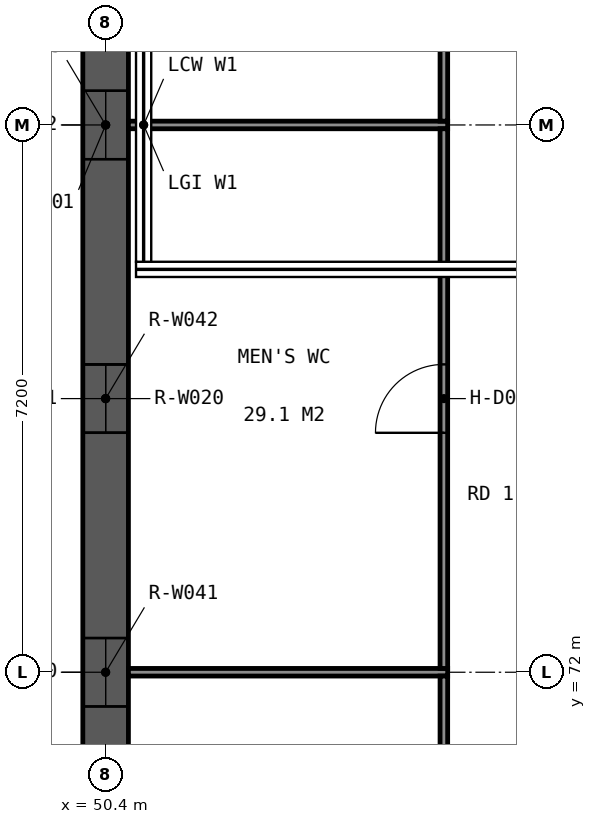
"""IFC4 building model, lengths in metres.
Left out: names, types, materials, properties, quantities, classifications, styles, units other than length and angle.
Written with IfcOpenShell. Run it as: python <this file> out.ifc"""

import sys

from ifc_helpers import new_model, si_unit, direction, frame, frame_2d, origin, place, context, subcontext, project, spatial, polyline, rectangle, outline, extrude, element, fill, save


model = new_model("IFC4")
c1 = context("Model", 3, precision=1e-05, world=origin(), true_north=direction((0.0, 1.0)))
c2 = subcontext(c1, "Body", "Model", "MODEL_VIEW")
j1 = project(units=[si_unit("LENGTHUNIT", "METRE"), si_unit("PLANEANGLEUNIT", "RADIAN")], contexts=[c1])
p1 = place(None, origin())
s1 = spatial("IfcSite", under=j1, at=p1, CompositionType="ELEMENT")
p2 = place(p1, origin())
s2 = spatial("IfcBuilding", under=s1, at=p2, CompositionType="ELEMENT")
p3 = place(p2, frame((0.0, 0.0, 9.6)))
s3 = spatial("IfcBuildingStorey", under=s2, at=p3, CompositionType="ELEMENT", Elevation=9.6)
p4 = place(p3, frame((50.4, 52.2, 0.0), z_axis=(0.0, 0.0, 1.0), x_axis=(0.0, 1.0, 0.0)))
e1 = element("IfcWall", 1, at=p4, inside=s3, PredefinedType="SOLIDWALL", context=c2, shape_type="SweptSolid", body=[
    extrude(outline(polyline([(0.0, 0.0), (54.0, 0.0), (54.0, 6.409), (53.7, 6.509), (53.4, 6.609), (53.1, 6.709), (52.8, 6.809), (52.5, 6.909), (52.2, 7.009), (51.9, 7.109), (51.6, 7.209), (51.3, 7.309), (51.0, 7.409), (50.764, 7.488), (50.762, 7.489), (50.7, 7.509), (50.4, 7.609), (50.1, 7.709), (49.8, 7.809), (49.5, 7.909), (49.2, 8.009), (48.9, 8.109), (48.6, 8.209), (48.3, 8.309), (48.0, 8.409), (47.7, 8.509), (47.4, 8.609), (47.1, 8.709), (46.8, 8.809), (46.5, 8.909), (46.2, 9.009), (46.027, 9.067), (46.025, 9.068), (45.964, 9.088), (45.962, 9.3), (45.9, 9.32), (45.6, 9.42), (45.3, 9.52), (45.0, 9.62), (44.7, 9.72), (44.4, 9.82), (44.1, 9.92), (43.8, 10.02), (43.5, 10.12), (43.2, 10.22), (42.9, 10.32), (42.6, 10.42), (42.3, 10.52), (42.0, 10.62), (41.7, 10.72), (41.4, 10.82), (41.227, 10.878), (41.225, 10.878), (41.1, 10.92), (40.8, 11.02), (40.5, 11.12), (40.2, 11.22), (39.9, 11.32), (39.6, 11.42), (39.3, 11.52), (39.0, 11.62), (38.7, 11.72), (38.4, 11.82), (38.1, 11.92), (37.8, 12.02), (37.5, 12.12), (37.2, 12.22), (36.9, 12.32), (36.6, 12.42), (36.49, 12.457), (36.488, 12.458), (36.427, 12.478), (36.425, 12.689), (36.3, 12.731), (36.0, 12.831), (35.7, 12.931), (35.4, 13.031), (35.1, 13.131), (34.8, 13.231), (34.5, 13.331), (34.2, 13.431), (33.9, 13.531), (33.6, 13.631), (33.3, 13.731), (33.0, 13.831), (32.7, 13.931), (32.4, 14.031), (32.1, 14.131), (31.8, 14.231), (31.69, 14.268), (31.688, 14.268), (31.5, 14.331), (31.2, 14.431), (30.9, 14.531), (30.6, 14.631), (30.3, 14.731), (30.0, 14.831), (29.7, 14.931), (29.4, 15.031), (29.1, 15.131), (28.8, 15.231), (28.5, 15.331), (28.2, 15.431), (27.9, 15.531), (27.6, 15.631), (27.3, 15.731), (27.201, 15.764), (27.199, 15.764), (27.0, 15.764), (26.801, 15.764), (26.799, 15.764), (26.7, 15.731), (26.4, 15.631), (26.1, 15.531), (25.8, 15.431), (25.5, 15.331), (25.2, 15.231), (24.9, 15.131), (24.6, 15.031), (24.3, 14.931), (24.0, 14.831), (23.7, 14.731), (23.4, 14.631), (23.1, 14.531), (22.8, 14.431), (22.5, 14.331), (22.312, 14.268), (22.31, 14.268), (22.2, 14.231), (21.9, 14.131), (21.6, 14.031), (21.3, 13.931), (21.0, 13.831), (20.7, 13.731), (20.4, 13.631), (20.1, 13.531), (19.8, 13.431), (19.5, 13.331), (19.2, 13.231), (18.9, 13.131), (18.6, 13.031), (18.3, 12.931), (18.0, 12.831), (17.7, 12.731), (17.575, 12.689), (17.573, 12.478), (17.512, 12.458), (17.51, 12.457), (17.4, 12.42), (17.1, 12.32), (16.8, 12.22), (16.5, 12.12), (16.2, 12.02), (15.9, 11.92), (15.6, 11.82), (15.3, 11.72), (15.0, 11.62), (14.7, 11.52), (14.4, 11.42), (14.1, 11.32), (13.8, 11.22), (13.5, 11.12), (13.2, 11.02), (12.9, 10.92), (12.775, 10.878), (12.773, 10.878), (12.6, 10.82), (12.3, 10.72), (12.0, 10.62), (11.7, 10.52), (11.4, 10.42), (11.1, 10.32), (10.8, 10.22), (10.5, 10.12), (10.2, 10.02), (9.9, 9.92), (9.6, 9.82), (9.3, 9.72), (9.0, 9.62), (8.7, 9.52), (8.4, 9.42), (8.1, 9.32), (8.038, 9.3), (8.036, 9.088), (7.975, 9.068), (7.973, 9.067), (7.8, 9.009), (7.5, 8.909), (7.2, 8.809), (6.9, 8.709), (6.6, 8.609), (6.3, 8.509), (6.0, 8.409), (5.7, 8.309), (5.4, 8.209), (5.1, 8.109), (4.8, 8.009), (4.5, 7.909), (4.2, 7.809), (3.9, 7.709), (3.6, 7.609), (3.3, 7.509), (3.238, 7.489), (3.236, 7.488), (3.0, 7.409), (2.7, 7.309), (2.4, 7.209), (2.1, 7.109), (1.8, 7.009), (1.5, 6.909), (1.2, 6.809), (0.9, 6.709), (0.6, 6.609), (0.3, 6.509), (0.0, 6.409), (0.0, 0.0)])), frame((0.0, 0.3, 0.0), z_axis=(0.0, -1.0, 0.0), x_axis=(1.0, 0.0, 0.0)), (0.0, 0.0, 1.0), 0.6),
])
p5 = place(p4, frame((1.35, 0.0, 0.9)))
e2 = element("IfcOpeningElement", 2, at=p5, cuts=e1, PredefinedType="OPENING", context=c2, shape_type="SweptSolid", body=[
    extrude(rectangle(XDim=0.9, YDim=3.3, at=frame_2d((0.45, 1.65))), frame((0.0, 0.31, 0.0), z_axis=(0.0, -1.0, 0.0), x_axis=(1.0, 0.0, 0.0)), (0.0, 0.0, 1.0), 0.62),
])
p6 = place(p4, frame((8.55, 0.0, 0.9)))
e3 = element("IfcOpeningElement", 3, at=p6, cuts=e1, PredefinedType="OPENING", context=c2, shape_type="SweptSolid", body=[
    extrude(rectangle(XDim=0.9, YDim=3.3, at=frame_2d((0.45, 1.65))), frame((0.0, 0.31, 0.0), z_axis=(0.0, -1.0, 0.0), x_axis=(1.0, 0.0, 0.0)), (0.0, 0.0, 1.0), 0.62),
])
p7 = place(p4, frame((15.75, 0.0, 0.9)))
e4 = element("IfcOpeningElement", 4, at=p7, cuts=e1, PredefinedType="OPENING", context=c2, shape_type="SweptSolid", body=[
    extrude(rectangle(XDim=0.9, YDim=3.3, at=frame_2d((0.45, 1.65))), frame((0.0, 0.31, 0.0), z_axis=(0.0, -1.0, 0.0), x_axis=(1.0, 0.0, 0.0)), (0.0, 0.0, 1.0), 0.62),
])
p8 = place(p4, frame((22.95, 0.0, 0.9)))
e5 = element("IfcOpeningElement", 5, at=p8, cuts=e1, PredefinedType="OPENING", context=c2, shape_type="SweptSolid", body=[
    extrude(rectangle(XDim=0.9, YDim=3.3, at=frame_2d((0.45, 1.65))), frame((0.0, 0.31, 0.0), z_axis=(0.0, -1.0, 0.0), x_axis=(1.0, 0.0, 0.0)), (0.0, 0.0, 1.0), 0.62),
])
p9 = place(p4, frame((30.15, 0.0, 0.9)))
e6 = element("IfcOpeningElement", 6, at=p9, cuts=e1, PredefinedType="OPENING", context=c2, shape_type="SweptSolid", body=[
    extrude(rectangle(XDim=0.9, YDim=3.3, at=frame_2d((0.45, 1.65))), frame((0.0, 0.31, 0.0), z_axis=(0.0, -1.0, 0.0), x_axis=(1.0, 0.0, 0.0)), (0.0, 0.0, 1.0), 0.62),
])
p10 = place(p4, frame((37.35, 0.0, 0.9)))
e7 = element("IfcOpeningElement", 7, at=p10, cuts=e1, PredefinedType="OPENING", context=c2, shape_type="SweptSolid", body=[
    extrude(rectangle(XDim=0.9, YDim=3.3, at=frame_2d((0.45, 1.65))), frame((0.0, 0.31, 0.0), z_axis=(0.0, -1.0, 0.0), x_axis=(1.0, 0.0, 0.0)), (0.0, 0.0, 1.0), 0.62),
])
p11 = place(p4, frame((44.55, 0.0, 0.9)))
e8 = element("IfcOpeningElement", 8, at=p11, cuts=e1, PredefinedType="OPENING", context=c2, shape_type="SweptSolid", body=[
    extrude(rectangle(XDim=0.9, YDim=3.3, at=frame_2d((0.45, 1.65))), frame((0.0, 0.31, 0.0), z_axis=(0.0, -1.0, 0.0), x_axis=(1.0, 0.0, 0.0)), (0.0, 0.0, 1.0), 0.62),
])
p12 = place(p4, frame((51.75, 0.0, 0.9)))
e9 = element("IfcOpeningElement", 9, at=p12, cuts=e1, PredefinedType="OPENING", context=c2, shape_type="SweptSolid", body=[
    extrude(rectangle(XDim=0.9, YDim=3.3, at=frame_2d((0.45, 1.65))), frame((0.0, 0.31, 0.0), z_axis=(0.0, -1.0, 0.0), x_axis=(1.0, 0.0, 0.0)), (0.0, 0.0, 1.0), 0.62),
])
p13 = place(p4, frame((1.35, 0.0, 4.8)))
e10 = element("IfcOpeningElement", 10, at=p13, cuts=e1, PredefinedType="OPENING", context=c2, shape_type="SweptSolid", body=[
    extrude(rectangle(XDim=0.9, YDim=1.5, at=frame_2d((0.45, 0.75))), frame((0.0, 0.31, 0.0), z_axis=(0.0, -1.0, 0.0), x_axis=(1.0, 0.0, 0.0)), (0.0, 0.0, 1.0), 0.62),
])
p14 = place(p4, frame((4.95, 0.0, 4.8)))
e11 = element("IfcOpeningElement", 11, at=p14, cuts=e1, PredefinedType="OPENING", context=c2, shape_type="SweptSolid", body=[
    extrude(rectangle(XDim=0.9, YDim=2.4, at=frame_2d((0.45, 1.2))), frame((0.0, 0.31, 0.0), z_axis=(0.0, -1.0, 0.0), x_axis=(1.0, 0.0, 0.0)), (0.0, 0.0, 1.0), 0.62),
])
p15 = place(p4, frame((8.55, 0.0, 4.8)))
e12 = element("IfcOpeningElement", 12, at=p15, cuts=e1, PredefinedType="OPENING", context=c2, shape_type="SweptSolid", body=[
    extrude(rectangle(XDim=0.9, YDim=3.3, at=frame_2d((0.45, 1.65))), frame((0.0, 0.31, 0.0), z_axis=(0.0, -1.0, 0.0), x_axis=(1.0, 0.0, 0.0)), (0.0, 0.0, 1.0), 0.62),
])
p16 = place(p4, frame((12.15, 0.0, 4.8)))
e13 = element("IfcOpeningElement", 13, at=p16, cuts=e1, PredefinedType="OPENING", context=c2, shape_type="SweptSolid", body=[
    extrude(rectangle(XDim=0.9, YDim=4.2, at=frame_2d((0.45, 2.1))), frame((0.0, 0.31, 0.0), z_axis=(0.0, -1.0, 0.0), x_axis=(1.0, 0.0, 0.0)), (0.0, 0.0, 1.0), 0.62),
])
p17 = place(p4, frame((15.75, 0.0, 4.8)))
e14 = element("IfcOpeningElement", 14, at=p17, cuts=e1, PredefinedType="OPENING", context=c2, shape_type="SweptSolid", body=[
    extrude(rectangle(XDim=0.9, YDim=4.2, at=frame_2d((0.45, 2.1))), frame((0.0, 0.31, 0.0), z_axis=(0.0, -1.0, 0.0), x_axis=(1.0, 0.0, 0.0)), (0.0, 0.0, 1.0), 0.62),
])
p18 = place(p4, frame((19.35, 0.0, 4.8)))
e15 = element("IfcOpeningElement", 15, at=p18, cuts=e1, PredefinedType="OPENING", context=c2, shape_type="SweptSolid", body=[
    extrude(rectangle(XDim=0.9, YDim=4.2, at=frame_2d((0.45, 2.1))), frame((0.0, 0.31, 0.0), z_axis=(0.0, -1.0, 0.0), x_axis=(1.0, 0.0, 0.0)), (0.0, 0.0, 1.0), 0.62),
])
p19 = place(p4, frame((22.95, 0.0, 4.8)))
e16 = element("IfcOpeningElement", 16, at=p19, cuts=e1, PredefinedType="OPENING", context=c2, shape_type="SweptSolid", body=[
    extrude(rectangle(XDim=0.9, YDim=4.2, at=frame_2d((0.45, 2.1))), frame((0.0, 0.31, 0.0), z_axis=(0.0, -1.0, 0.0), x_axis=(1.0, 0.0, 0.0)), (0.0, 0.0, 1.0), 0.62),
])
p20 = place(p4, frame((26.55, 0.0, 4.8)))
e17 = element("IfcOpeningElement", 17, at=p20, cuts=e1, PredefinedType="OPENING", context=c2, shape_type="SweptSolid", body=[
    extrude(rectangle(XDim=0.9, YDim=4.2, at=frame_2d((0.45, 2.1))), frame((0.0, 0.31, 0.0), z_axis=(0.0, -1.0, 0.0), x_axis=(1.0, 0.0, 0.0)), (0.0, 0.0, 1.0), 0.62),
])
p21 = place(p4, frame((30.15, 0.0, 4.8)))
e18 = element("IfcOpeningElement", 18, at=p21, cuts=e1, PredefinedType="OPENING", context=c2, shape_type="SweptSolid", body=[
    extrude(rectangle(XDim=0.9, YDim=4.2, at=frame_2d((0.45, 2.1))), frame((0.0, 0.31, 0.0), z_axis=(0.0, -1.0, 0.0), x_axis=(1.0, 0.0, 0.0)), (0.0, 0.0, 1.0), 0.62),
])
p22 = place(p4, frame((33.75, 0.0, 4.8)))
e19 = element("IfcOpeningElement", 19, at=p22, cuts=e1, PredefinedType="OPENING", context=c2, shape_type="SweptSolid", body=[
    extrude(rectangle(XDim=0.9, YDim=4.2, at=frame_2d((0.45, 2.1))), frame((0.0, 0.31, 0.0), z_axis=(0.0, -1.0, 0.0), x_axis=(1.0, 0.0, 0.0)), (0.0, 0.0, 1.0), 0.62),
])
p23 = place(p4, frame((37.35, 0.0, 4.8)))
e20 = element("IfcOpeningElement", 20, at=p23, cuts=e1, PredefinedType="OPENING", context=c2, shape_type="SweptSolid", body=[
    extrude(rectangle(XDim=0.9, YDim=4.2, at=frame_2d((0.45, 2.1))), frame((0.0, 0.31, 0.0), z_axis=(0.0, -1.0, 0.0), x_axis=(1.0, 0.0, 0.0)), (0.0, 0.0, 1.0), 0.62),
])
p24 = place(p4, frame((40.95, 0.0, 4.8)))
e21 = element("IfcOpeningElement", 21, at=p24, cuts=e1, PredefinedType="OPENING", context=c2, shape_type="SweptSolid", body=[
    extrude(rectangle(XDim=0.9, YDim=4.2, at=frame_2d((0.45, 2.1))), frame((0.0, 0.31, 0.0), z_axis=(0.0, -1.0, 0.0), x_axis=(1.0, 0.0, 0.0)), (0.0, 0.0, 1.0), 0.62),
])
p25 = place(p4, frame((44.55, 0.0, 4.8)))
e22 = element("IfcOpeningElement", 22, at=p25, cuts=e1, PredefinedType="OPENING", context=c2, shape_type="SweptSolid", body=[
    extrude(rectangle(XDim=0.9, YDim=3.3, at=frame_2d((0.45, 1.65))), frame((0.0, 0.31, 0.0), z_axis=(0.0, -1.0, 0.0), x_axis=(1.0, 0.0, 0.0)), (0.0, 0.0, 1.0), 0.62),
])
p26 = place(p4, frame((48.15, 0.0, 4.8)))
e23 = element("IfcOpeningElement", 23, at=p26, cuts=e1, PredefinedType="OPENING", context=c2, shape_type="SweptSolid", body=[
    extrude(rectangle(XDim=0.9, YDim=2.4, at=frame_2d((0.45, 1.2))), frame((0.0, 0.31, 0.0), z_axis=(0.0, -1.0, 0.0), x_axis=(1.0, 0.0, 0.0)), (0.0, 0.0, 1.0), 0.62),
])
p27 = place(p4, frame((51.75, 0.0, 4.8)))
e24 = element("IfcOpeningElement", 24, at=p27, cuts=e1, PredefinedType="OPENING", context=c2, shape_type="SweptSolid", body=[
    extrude(rectangle(XDim=0.9, YDim=1.5, at=frame_2d((0.45, 0.75))), frame((0.0, 0.31, 0.0), z_axis=(0.0, -1.0, 0.0), x_axis=(1.0, 0.0, 0.0)), (0.0, 0.0, 1.0), 0.62),
])
p28 = place(p4, frame((15.75, 0.0, 9.6)))
e25 = element("IfcOpeningElement", 25, at=p28, cuts=e1, PredefinedType="OPENING", context=c2, shape_type="SweptSolid", body=[
    extrude(rectangle(XDim=0.9, YDim=1.5, at=frame_2d((0.45, 0.75))), frame((0.0, 0.31, 0.0), z_axis=(0.0, -1.0, 0.0), x_axis=(1.0, 0.0, 0.0)), (0.0, 0.0, 1.0), 0.62),
])
p29 = place(p4, frame((19.35, 0.0, 9.6)))
e26 = element("IfcOpeningElement", 26, at=p29, cuts=e1, PredefinedType="OPENING", context=c2, shape_type="SweptSolid", body=[
    extrude(rectangle(XDim=0.9, YDim=2.4, at=frame_2d((0.45, 1.2))), frame((0.0, 0.31, 0.0), z_axis=(0.0, -1.0, 0.0), x_axis=(1.0, 0.0, 0.0)), (0.0, 0.0, 1.0), 0.62),
])
p30 = place(p4, frame((22.95, 0.0, 9.6)))
e27 = element("IfcOpeningElement", 27, at=p30, cuts=e1, PredefinedType="OPENING", context=c2, shape_type="SweptSolid", body=[
    extrude(rectangle(XDim=0.9, YDim=4.2, at=frame_2d((0.45, 2.1))), frame((0.0, 0.31, 0.0), z_axis=(0.0, -1.0, 0.0), x_axis=(1.0, 0.0, 0.0)), (0.0, 0.0, 1.0), 0.62),
])
p31 = place(p4, frame((26.55, 0.0, 9.6)))
e28 = element("IfcOpeningElement", 28, at=p31, cuts=e1, PredefinedType="OPENING", context=c2, shape_type="SweptSolid", body=[
    extrude(rectangle(XDim=0.9, YDim=4.2, at=frame_2d((0.45, 2.1))), frame((0.0, 0.31, 0.0), z_axis=(0.0, -1.0, 0.0), x_axis=(1.0, 0.0, 0.0)), (0.0, 0.0, 1.0), 0.62),
])
p32 = place(p4, frame((30.15, 0.0, 9.6)))
e29 = element("IfcOpeningElement", 29, at=p32, cuts=e1, PredefinedType="OPENING", context=c2, shape_type="SweptSolid", body=[
    extrude(rectangle(XDim=0.9, YDim=4.2, at=frame_2d((0.45, 2.1))), frame((0.0, 0.31, 0.0), z_axis=(0.0, -1.0, 0.0), x_axis=(1.0, 0.0, 0.0)), (0.0, 0.0, 1.0), 0.62),
])
p33 = place(p4, frame((33.75, 0.0, 9.6)))
e30 = element("IfcOpeningElement", 30, at=p33, cuts=e1, PredefinedType="OPENING", context=c2, shape_type="SweptSolid", body=[
    extrude(rectangle(XDim=0.9, YDim=2.4, at=frame_2d((0.45, 1.2))), frame((0.0, 0.31, 0.0), z_axis=(0.0, -1.0, 0.0), x_axis=(1.0, 0.0, 0.0)), (0.0, 0.0, 1.0), 0.62),
])
p34 = place(p4, frame((37.35, 0.0, 9.6)))
e31 = element("IfcOpeningElement", 31, at=p34, cuts=e1, PredefinedType="OPENING", context=c2, shape_type="SweptSolid", body=[
    extrude(rectangle(XDim=0.9, YDim=1.5, at=frame_2d((0.45, 0.75))), frame((0.0, 0.31, 0.0), z_axis=(0.0, -1.0, 0.0), x_axis=(1.0, 0.0, 0.0)), (0.0, 0.0, 1.0), 0.62),
])
for number, where, z_axis, x_axis in (
    (32, (50.7, 72.0, 0.0), (0.0, 0.0, 1.0), (1.0, 0.0, 0.0)),
    (33, (50.7, 79.2, 0.0), (0.0, 0.0, 1.0), (1.0, 0.0, 0.0)),
):
    element("IfcWall", number, at=place(p3, frame(where, z_axis=z_axis, x_axis=x_axis)), inside=s3, PredefinedType="PARTITIONING", context=c2, shape_type="SweptSolid", body=[
        extrude(rectangle(XDim=4.2, YDim=0.1, at=frame_2d((2.1, 0.0))), origin(), (0.0, 0.0, 1.0), 4.7),
    ])
p35 = place(p3, frame((54.85, 64.85, 0.0), z_axis=(0.0, 0.0, 1.0), x_axis=(0.0, 1.0, 0.0)))
e34 = element("IfcWall", 34, at=p35, inside=s3, PredefinedType="PARTITIONING", context=c2, shape_type="SweptSolid", body=[
    extrude(rectangle(XDim=7.1, YDim=0.1, at=frame_2d((3.55, 0.0))), origin(), (0.0, 0.0, 1.0), 4.7),
])
p36 = place(p35, frame((3.1, 0.0, 0.0)))
e35 = element("IfcOpeningElement", 35, at=p36, cuts=e34, PredefinedType="OPENING", context=c2, shape_type="SweptSolid", body=[
    extrude(rectangle(XDim=0.9, YDim=2.1, at=frame_2d((0.45, 1.05))), frame((0.0, 0.06, 0.0), z_axis=(0.0, -1.0, 0.0), x_axis=(1.0, 0.0, 0.0)), (0.0, 0.0, 1.0), 0.12),
])
p37 = place(p3, frame((54.85, 72.05, 0.0), z_axis=(0.0, 0.0, 1.0), x_axis=(0.0, 1.0, 0.0)))
e36 = element("IfcWall", 36, at=p37, inside=s3, PredefinedType="PARTITIONING", context=c2, shape_type="SweptSolid", body=[
    extrude(rectangle(XDim=7.1, YDim=0.1, at=frame_2d((3.55, 0.0))), origin(), (0.0, 0.0, 1.0), 4.7),
])
p38 = place(p37, frame((3.1, 0.0, 0.0)))
e37 = element("IfcOpeningElement", 37, at=p38, cuts=e36, PredefinedType="OPENING", context=c2, shape_type="SweptSolid", body=[
    extrude(rectangle(XDim=0.9, YDim=2.1, at=frame_2d((0.45, 1.05))), frame((0.0, 0.06, 0.0), z_axis=(0.0, -1.0, 0.0), x_axis=(1.0, 0.0, 0.0)), (0.0, 0.0, 1.0), 0.12),
])
p39 = place(p3, frame((54.85, 79.25, 0.0), z_axis=(0.0, 0.0, 1.0), x_axis=(0.0, 1.0, 0.0)))
e38 = element("IfcWall", 38, at=p39, inside=s3, PredefinedType="PARTITIONING", context=c2, shape_type="SweptSolid", body=[
    extrude(rectangle(XDim=7.1, YDim=0.1, at=frame_2d((3.55, 0.0))), origin(), (0.0, 0.0, 1.0), 4.7),
])
p40 = place(p39, frame((3.05, 0.0, 0.0)))
e39 = element("IfcOpeningElement", 39, at=p40, cuts=e38, PredefinedType="OPENING", context=c2, shape_type="SweptSolid", body=[
    extrude(rectangle(XDim=1.0, YDim=2.1, at=frame_2d((0.5, 1.05))), frame((0.0, 0.06, 0.0), z_axis=(0.0, -1.0, 0.0), x_axis=(1.0, 0.0, 0.0)), (0.0, 0.0, 1.0), 0.12),
])
p41 = place(p8, origin())
e40 = element("IfcWindow", 40, at=p41, inside=s3, PartitioningType="SINGLE_PANEL", PredefinedType="WINDOW", context=c2, shape_type="SweptSolid", body=[
    extrude(rectangle(XDim=0.9, YDim=3.3, at=frame_2d((0.45, 1.65))), frame((0.0, 0.03, 0.0), z_axis=(0.0, -1.0, 0.0), x_axis=(1.0, 0.0, 0.0)), (0.0, 0.0, 1.0), 0.06),
])
fill(e5, e40)
p42 = place(p18, origin())
e41 = element("IfcWindow", 41, at=p42, inside=s3, PartitioningType="SINGLE_PANEL", PredefinedType="WINDOW", context=c2, shape_type="SweptSolid", body=[
    extrude(rectangle(XDim=0.9, YDim=4.2, at=frame_2d((0.45, 2.1))), frame((0.0, 0.03, 0.0), z_axis=(0.0, -1.0, 0.0), x_axis=(1.0, 0.0, 0.0)), (0.0, 0.0, 1.0), 0.06),
])
fill(e15, e41)
p43 = place(p19, origin())
e42 = element("IfcWindow", 42, at=p43, inside=s3, PartitioningType="SINGLE_PANEL", PredefinedType="WINDOW", context=c2, shape_type="SweptSolid", body=[
    extrude(rectangle(XDim=0.9, YDim=4.2, at=frame_2d((0.45, 2.1))), frame((0.0, 0.03, 0.0), z_axis=(0.0, -1.0, 0.0), x_axis=(1.0, 0.0, 0.0)), (0.0, 0.0, 1.0), 0.06),
])
fill(e16, e42)
p44 = place(p20, origin())
e43 = element("IfcWindow", 43, at=p44, inside=s3, PartitioningType="SINGLE_PANEL", PredefinedType="WINDOW", context=c2, shape_type="SweptSolid", body=[
    extrude(rectangle(XDim=0.9, YDim=4.2, at=frame_2d((0.45, 2.1))), frame((0.0, 0.03, 0.0), z_axis=(0.0, -1.0, 0.0), x_axis=(1.0, 0.0, 0.0)), (0.0, 0.0, 1.0), 0.06),
])
fill(e17, e43)
p45 = place(p29, origin())
e44 = element("IfcWindow", 44, at=p45, inside=s3, PartitioningType="SINGLE_PANEL", PredefinedType="WINDOW", context=c2, shape_type="SweptSolid", body=[
    extrude(rectangle(XDim=0.9, YDim=2.4, at=frame_2d((0.45, 1.2))), frame((0.0, 0.03, 0.0), z_axis=(0.0, -1.0, 0.0), x_axis=(1.0, 0.0, 0.0)), (0.0, 0.0, 1.0), 0.06),
])
fill(e26, e44)
p46 = place(p30, origin())
e45 = element("IfcWindow", 45, at=p46, inside=s3, PartitioningType="SINGLE_PANEL", PredefinedType="WINDOW", context=c2, shape_type="SweptSolid", body=[
    extrude(rectangle(XDim=0.9, YDim=4.2, at=frame_2d((0.45, 2.1))), frame((0.0, 0.03, 0.0), z_axis=(0.0, -1.0, 0.0), x_axis=(1.0, 0.0, 0.0)), (0.0, 0.0, 1.0), 0.06),
])
fill(e27, e45)
p47 = place(p31, origin())
e46 = element("IfcWindow", 46, at=p47, inside=s3, PartitioningType="SINGLE_PANEL", PredefinedType="WINDOW", context=c2, shape_type="SweptSolid", body=[
    extrude(rectangle(XDim=0.9, YDim=4.2, at=frame_2d((0.45, 2.1))), frame((0.0, 0.03, 0.0), z_axis=(0.0, -1.0, 0.0), x_axis=(1.0, 0.0, 0.0)), (0.0, 0.0, 1.0), 0.06),
])
fill(e28, e46)
p48 = place(p38, origin())
e47 = element("IfcDoor", 47, at=p48, inside=s3, OperationType="SINGLE_SWING_LEFT", PredefinedType="DOOR", context=c2, shape_type="SweptSolid", body=[
    extrude(rectangle(XDim=0.9, YDim=2.1, at=frame_2d((0.45, 1.05))), frame((0.0, 0.025, 0.0), z_axis=(0.0, -1.0, 0.0), x_axis=(1.0, 0.0, 0.0)), (0.0, 0.0, 1.0), 0.05),
])
fill(e37, e47)
save(model, sys.argv[1])
